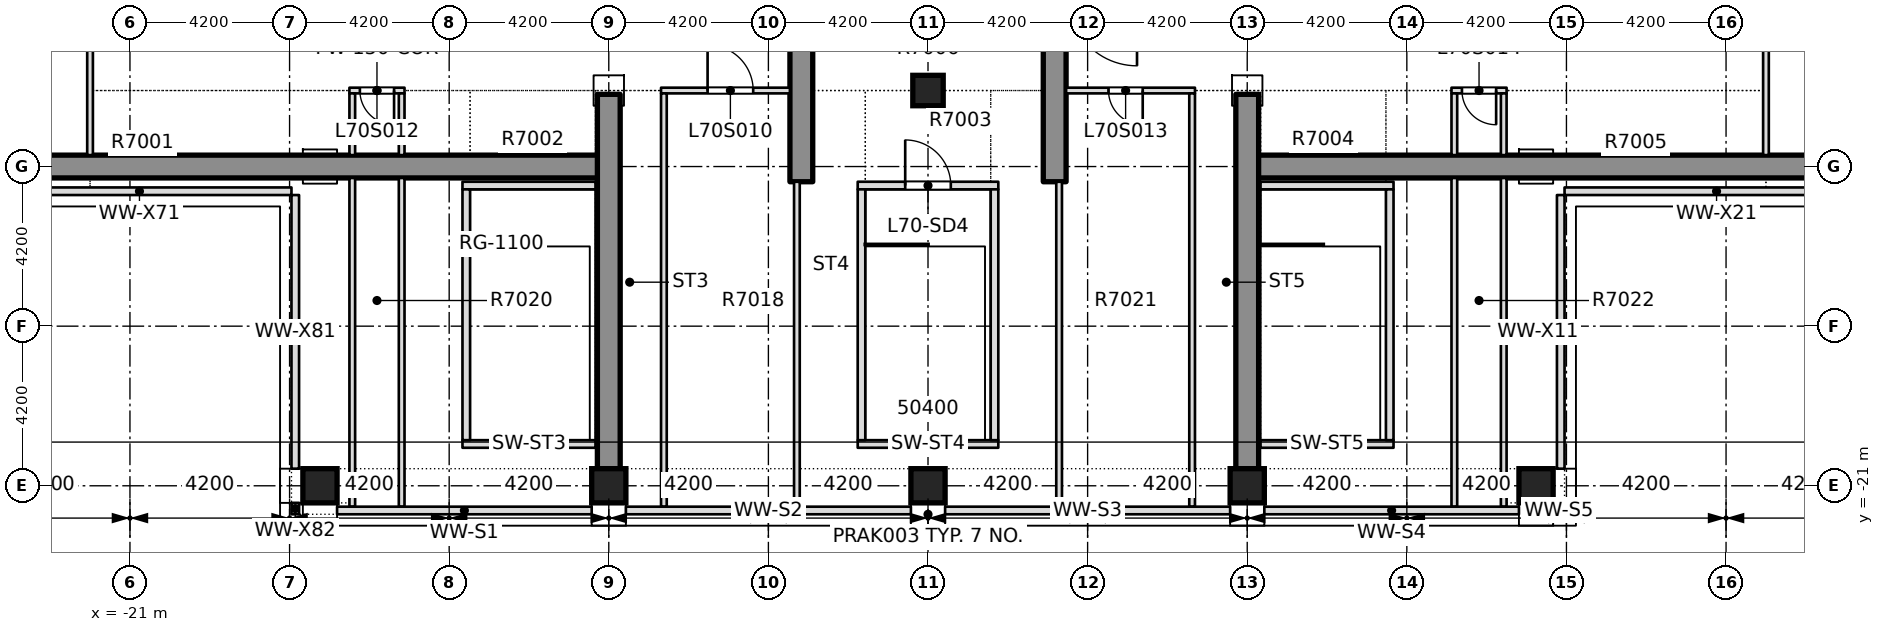
"""IFC4 building model, lengths in metres.
Left out: names, types, materials, properties, quantities, classifications, styles, units other than length and angle.
Written with IfcOpenShell. Run it as: python <this file> out.ifc"""

import sys

from ifc_helpers import new_model, si_unit, direction, frame, frame_2d, origin, origin_2d, place, context, subcontext, project, spatial, rectangle, extrude, element, fill, save


model = new_model("IFC4")
c1 = context("Model", 3, precision=1e-05, world=origin(), true_north=direction((0.0, 1.0)))
c2 = subcontext(c1, "Body", "Model", "MODEL_VIEW")
j1 = project(units=[si_unit("LENGTHUNIT", "METRE"), si_unit("PLANEANGLEUNIT", "RADIAN")], contexts=[c1])
p1 = place(None, origin())
s1 = spatial("IfcSite", under=j1, at=p1, CompositionType="ELEMENT")
p2 = place(p1, origin())
s2 = spatial("IfcBuilding", under=s1, at=p2, CompositionType="ELEMENT")
p3 = place(p2, frame((0.0, 0.0, 264.85)))
s3 = spatial("IfcBuildingStorey", under=s2, at=p3, CompositionType="ELEMENT", Elevation=264.85)
for number, where, z_axis, x_axis in (
    (1, (-16.0, -21.0, -0.5), (0.0, 0.0, 1.0), (1.0, 0.0, 0.0)),
    (2, (-8.4, -21.0, -0.5), (0.0, 0.0, 1.0), (1.0, 0.0, 0.0)),
    (3, (0.0, -21.0, -0.5), (0.0, 0.0, 1.0), (1.0, 0.0, 0.0)),
    (4, (8.4, -21.0, -0.5), (0.0, 0.0, 1.0), (1.0, 0.0, 0.0)),
    (5, (16.0, -21.0, -0.5), (0.0, 0.0, 1.0), (1.0, 0.0, 0.0)),
):
    element("IfcColumn", number, at=place(p3, frame(where, z_axis=z_axis, x_axis=x_axis)), inside=s3, PredefinedType="COLUMN", context=c2, shape_type="SweptSolid", body=[
        extrude(rectangle(XDim=0.9, YDim=0.9, at=origin_2d()), origin(), (0.0, 0.0, 1.0), 1.6),
    ])
p4 = place(p3, frame((0.0, -10.6, -0.5), z_axis=(0.0, 0.0, 1.0), x_axis=(1.0, 0.0, 0.0)))
e6 = element("IfcColumn", 6, at=p4, inside=s3, PredefinedType="COLUMN", context=c2, shape_type="SweptSolid", body=[
    extrude(rectangle(XDim=0.8, YDim=0.8, at=origin_2d()), origin(), (0.0, 0.0, 1.0), 3.0),
])
for number, where, z_axis, x_axis in (
    (7, (-3.333, -13.0, 0.0), (0.0, 0.0, 1.0), (0.0, 1.0, 0.0)),
    (8, (3.333, -13.0, 0.0), (0.0, 0.0, 1.0), (0.0, 1.0, 0.0)),
):
    element("IfcWall", number, at=place(p3, frame(where, z_axis=z_axis, x_axis=x_axis)), inside=s3, PredefinedType="SOLIDWALL", context=c2, shape_type="SweptSolid", body=[
        extrude(rectangle(XDim=4.6, YDim=0.6, at=frame_2d((2.3, 0.0))), origin(), (0.0, 0.0, 1.0), 4.0),
    ])
for number, where, z_axis, x_axis in (
    (9, (8.55, -12.6, 0.0), (0.0, 0.0, 1.0), (1.0, 0.0, 0.0)),
    (10, (-8.55, -12.6, 0.0), (0.0, 0.0, 1.0), (-1.0, 0.0, 0.0)),
):
    element("IfcWall", number, at=place(p3, frame(where, z_axis=z_axis, x_axis=x_axis)), inside=s3, PredefinedType="SHEAR", context=c2, shape_type="SweptSolid", body=[
        extrude(rectangle(XDim=16.65, YDim=0.6, at=frame_2d((8.325, 0.0))), origin(), (0.0, 0.0, 1.0), 4.0),
    ])
for number, where, z_axis, x_axis in (
    (11, (-8.4, -10.7, 0.0), (0.0, 0.0, 1.0), (0.0, -1.0, 0.0)),
    (12, (8.4, -10.7, 0.0), (0.0, 0.0, 1.0), (0.0, -1.0, 0.0)),
):
    element("IfcWall", number, at=place(p3, frame(where, z_axis=z_axis, x_axis=x_axis)), inside=s3, PredefinedType="SHEAR", context=c2, shape_type="SweptSolid", body=[
        extrude(rectangle(XDim=9.85, YDim=0.6, at=frame_2d((4.925, 0.0))), origin(), (0.0, 0.0, 1.0), 4.0),
    ])
p5 = place(p3, frame((-15.225, -10.6, 0.0), z_axis=(0.0, 0.0, 1.0), x_axis=(1.0, 0.0, 0.0)))
e13 = element("IfcWall", 13, at=p5, inside=s3, PredefinedType="PARTITIONING", context=c2, shape_type="SweptSolid", body=[
    extrude(rectangle(XDim=1.45, YDim=0.15, at=frame_2d((0.725, 0.0))), origin(), (0.0, 0.0, 1.0), 4.0),
])
p6 = place(p5, frame((0.275, 0.0, 0.0)))
e14 = element("IfcOpeningElement", 14, at=p6, cuts=e13, PredefinedType="OPENING", context=c2, shape_type="SweptSolid", body=[
    extrude(rectangle(XDim=0.9, YDim=2.1, at=frame_2d((0.45, 1.05))), frame((0.0, 0.085, 0.0), z_axis=(0.0, -1.0, 0.0), x_axis=(1.0, 0.0, 0.0)), (0.0, 0.0, 1.0), 0.17),
])
p7 = place(p3, frame((-7.025, -10.6, 0.0), z_axis=(0.0, 0.0, 1.0), x_axis=(1.0, 0.0, 0.0)))
e15 = element("IfcWall", 15, at=p7, inside=s3, PredefinedType="PARTITIONING", context=c2, shape_type="SweptSolid", body=[
    extrude(rectangle(XDim=3.391, YDim=0.15, at=frame_2d((1.695, 0.0))), origin(), (0.0, 0.0, 1.0), 2.5),
])
p8 = place(p7, frame((1.225, 0.0, 0.0)))
e16 = element("IfcOpeningElement", 16, at=p8, cuts=e15, PredefinedType="OPENING", context=c2, shape_type="SweptSolid", body=[
    extrude(rectangle(XDim=1.2, YDim=2.1, at=frame_2d((0.6, 1.05))), frame((0.0, 0.085, 0.0), z_axis=(0.0, -1.0, 0.0), x_axis=(1.0, 0.0, 0.0)), (0.0, 0.0, 1.0), 0.17),
])
p9 = place(p3, frame((3.634, -10.6, 0.0), z_axis=(0.0, 0.0, 1.0), x_axis=(1.0, 0.0, 0.0)))
e17 = element("IfcWall", 17, at=p9, inside=s3, PredefinedType="PARTITIONING", context=c2, shape_type="SweptSolid", body=[
    extrude(rectangle(XDim=3.391, YDim=0.15, at=frame_2d((1.695, 0.0))), origin(), (0.0, 0.0, 1.0), 2.5),
])
p10 = place(p9, frame((1.116, 0.0, 0.0)))
e18 = element("IfcOpeningElement", 18, at=p10, cuts=e17, PredefinedType="OPENING", context=c2, shape_type="SweptSolid", body=[
    extrude(rectangle(XDim=0.9, YDim=2.1, at=frame_2d((0.45, 1.05))), frame((0.0, 0.085, 0.0), z_axis=(0.0, -1.0, 0.0), x_axis=(1.0, 0.0, 0.0)), (0.0, 0.0, 1.0), 0.17),
])
p11 = place(p3, frame((13.775, -10.6, 0.0), z_axis=(0.0, 0.0, 1.0), x_axis=(1.0, 0.0, 0.0)))
e19 = element("IfcWall", 19, at=p11, inside=s3, PredefinedType="PARTITIONING", context=c2, shape_type="SweptSolid", body=[
    extrude(rectangle(XDim=1.45, YDim=0.15, at=frame_2d((0.725, 0.0))), origin(), (0.0, 0.0, 1.0), 4.0),
])
p12 = place(p11, frame((0.275, 0.0, 0.0)))
e20 = element("IfcOpeningElement", 20, at=p12, cuts=e19, PredefinedType="OPENING", context=c2, shape_type="SweptSolid", body=[
    extrude(rectangle(XDim=0.9, YDim=2.1, at=frame_2d((0.45, 1.05))), frame((0.0, 0.085, 0.0), z_axis=(0.0, -1.0, 0.0), x_axis=(1.0, 0.0, 0.0)), (0.0, 0.0, 1.0), 0.17),
])
p13 = place(p3, frame((-22.05, -12.299, 0.0), z_axis=(0.0, 0.0, 1.0), x_axis=(0.0, 1.0, 0.0)))
e21 = element("IfcWall", 21, at=p13, inside=s3, PredefinedType="PARTITIONING", context=c2, shape_type="SweptSolid", body=[
    extrude(rectangle(XDim=3.824, YDim=0.15, at=frame_2d((1.912, 0.0))), origin(), (0.0, 0.0, 1.0), 4.0),
])
p14 = place(p3, frame((-15.15, -21.55, 0.0), z_axis=(0.0, 0.0, 1.0), x_axis=(0.0, 1.0, 0.0)))
e22 = element("IfcWall", 22, at=p14, inside=s3, PredefinedType="PARTITIONING", context=c2, shape_type="SweptSolid", body=[
    extrude(rectangle(XDim=8.649, YDim=0.15, at=frame_2d((4.325, 0.0))), origin(), (0.0, 0.0, 1.0), 4.0),
])
p15 = place(p3, frame((-15.15, -12.299, 0.0), z_axis=(0.0, 0.0, 1.0), x_axis=(0.0, 1.0, 0.0)))
e23 = element("IfcWall", 23, at=p15, inside=s3, PredefinedType="PARTITIONING", context=c2, shape_type="SweptSolid", body=[
    extrude(rectangle(XDim=1.624, YDim=0.15, at=frame_2d((0.812, 0.0))), origin(), (0.0, 0.0, 1.0), 4.0),
])
p16 = place(p3, frame((-13.85, -21.55, 0.0), z_axis=(0.0, 0.0, 1.0), x_axis=(0.0, 1.0, 0.0)))
e24 = element("IfcWall", 24, at=p16, inside=s3, PredefinedType="PARTITIONING", context=c2, shape_type="SweptSolid", body=[
    extrude(rectangle(XDim=8.649, YDim=0.15, at=frame_2d((4.325, 0.0))), origin(), (0.0, 0.0, 1.0), 4.0),
])
p17 = place(p3, frame((-13.85, -12.299, 0.0), z_axis=(0.0, 0.0, 1.0), x_axis=(0.0, 1.0, 0.0)))
e25 = element("IfcWall", 25, at=p17, inside=s3, PredefinedType="PARTITIONING", context=c2, shape_type="SweptSolid", body=[
    extrude(rectangle(XDim=1.624, YDim=0.15, at=frame_2d((0.812, 0.0))), origin(), (0.0, 0.0, 1.0), 4.0),
])
p18 = place(p3, frame((-6.95, -21.55, 0.0), z_axis=(0.0, 0.0, 1.0), x_axis=(0.0, 1.0, 0.0)))
e26 = element("IfcWall", 26, at=p18, inside=s3, PredefinedType="PARTITIONING", context=c2, shape_type="SweptSolid", body=[
    extrude(rectangle(XDim=10.875, YDim=0.15, at=frame_2d((5.438, 0.0))), origin(), (0.0, 0.0, 1.0), 4.0),
])
for number, where, z_axis, x_axis in (
    (27, (-3.45, -21.55, 0.0), (0.0, 0.0, 1.0), (0.0, 1.0, 0.0)),
    (28, (3.45, -21.55, 0.0), (0.0, 0.0, 1.0), (0.0, 1.0, 0.0)),
):
    element("IfcWall", number, at=place(p3, frame(where, z_axis=z_axis, x_axis=x_axis)), inside=s3, PredefinedType="PARTITIONING", context=c2, shape_type="SweptSolid", body=[
        extrude(rectangle(XDim=8.549, YDim=0.15, at=frame_2d((4.274, 0.0))), origin(), (0.0, 0.0, 1.0), 4.0),
    ])
p19 = place(p3, frame((6.95, -21.55, 0.0), z_axis=(0.0, 0.0, 1.0), x_axis=(0.0, 1.0, 0.0)))
e29 = element("IfcWall", 29, at=p19, inside=s3, PredefinedType="PARTITIONING", context=c2, shape_type="SweptSolid", body=[
    extrude(rectangle(XDim=10.875, YDim=0.15, at=frame_2d((5.438, 0.0))), origin(), (0.0, 0.0, 1.0), 4.0),
])
p20 = place(p3, frame((13.85, -21.55, 0.0), z_axis=(0.0, 0.0, 1.0), x_axis=(0.0, 1.0, 0.0)))
e30 = element("IfcWall", 30, at=p20, inside=s3, PredefinedType="PARTITIONING", context=c2, shape_type="SweptSolid", body=[
    extrude(rectangle(XDim=8.649, YDim=0.15, at=frame_2d((4.325, 0.0))), origin(), (0.0, 0.0, 1.0), 4.0),
])
p21 = place(p3, frame((13.85, -12.299, 0.0), z_axis=(0.0, 0.0, 1.0), x_axis=(0.0, 1.0, 0.0)))
e31 = element("IfcWall", 31, at=p21, inside=s3, PredefinedType="PARTITIONING", context=c2, shape_type="SweptSolid", body=[
    extrude(rectangle(XDim=1.624, YDim=0.15, at=frame_2d((0.812, 0.0))), origin(), (0.0, 0.0, 1.0), 4.0),
])
p22 = place(p3, frame((15.15, -21.55, 0.0), z_axis=(0.0, 0.0, 1.0), x_axis=(0.0, 1.0, 0.0)))
e32 = element("IfcWall", 32, at=p22, inside=s3, PredefinedType="PARTITIONING", context=c2, shape_type="SweptSolid", body=[
    extrude(rectangle(XDim=8.649, YDim=0.15, at=frame_2d((4.325, 0.0))), origin(), (0.0, 0.0, 1.0), 4.0),
])
p23 = place(p3, frame((15.15, -12.299, 0.0), z_axis=(0.0, 0.0, 1.0), x_axis=(0.0, 1.0, 0.0)))
e33 = element("IfcWall", 33, at=p23, inside=s3, PredefinedType="PARTITIONING", context=c2, shape_type="SweptSolid", body=[
    extrude(rectangle(XDim=1.624, YDim=0.15, at=frame_2d((0.812, 0.0))), origin(), (0.0, 0.0, 1.0), 4.0),
])
p24 = place(p3, frame((22.05, -12.299, 0.0), z_axis=(0.0, 0.0, 1.0), x_axis=(0.0, 1.0, 0.0)))
e34 = element("IfcWall", 34, at=p24, inside=s3, PredefinedType="PARTITIONING", context=c2, shape_type="SweptSolid", body=[
    extrude(rectangle(XDim=3.824, YDim=0.15, at=frame_2d((1.912, 0.0))), origin(), (0.0, 0.0, 1.0), 4.0),
])
p25 = place(p3, frame((-15.55, -21.65, 0.0), z_axis=(0.0, 0.0, 1.0), x_axis=(1.0, 0.0, 0.0)))
e35 = element("IfcWall", 35, at=p25, inside=s3, PredefinedType="STANDARD", context=c2, shape_type="SweptSolid", body=[
    extrude(rectangle(XDim=6.7, YDim=0.2, at=frame_2d((3.35, 0.0))), origin(), (0.0, 0.0, 1.0), 4.0),
])
for number, where, z_axis, x_axis in (
    (36, (-7.95, -21.65, 0.0), (0.0, 0.0, 1.0), (1.0, 0.0, 0.0)),
    (37, (0.45, -21.65, 0.0), (0.0, 0.0, 1.0), (1.0, 0.0, 0.0)),
):
    element("IfcWall", number, at=place(p3, frame(where, z_axis=z_axis, x_axis=x_axis)), inside=s3, PredefinedType="STANDARD", context=c2, shape_type="SweptSolid", body=[
        extrude(rectangle(XDim=7.5, YDim=0.2, at=frame_2d((3.75, 0.0))), origin(), (0.0, 0.0, 1.0), 4.0),
    ])
p26 = place(p3, frame((8.85, -21.65, 0.0), z_axis=(0.0, 0.0, 1.0), x_axis=(1.0, 0.0, 0.0)))
e38 = element("IfcWall", 38, at=p26, inside=s3, PredefinedType="STANDARD", context=c2, shape_type="SweptSolid", body=[
    extrude(rectangle(XDim=6.7, YDim=0.2, at=frame_2d((3.35, 0.0))), origin(), (0.0, 0.0, 1.0), 4.0),
])
p27 = place(p3, frame((16.45, -21.65, 0.0), z_axis=(0.0, 0.0, 1.0), x_axis=(1.0, 0.0, 0.0)))
e39 = element("IfcWall", 39, at=p27, inside=s3, PredefinedType="STANDARD", context=c2, shape_type="SweptSolid", body=[
    extrude(rectangle(XDim=0.3, YDim=0.2, at=frame_2d((0.15, 0.0))), origin(), (0.0, 0.0, 1.0), 4.0),
])
p28 = place(p3, frame((16.65, -20.55, 0.0), z_axis=(0.0, 0.0, 1.0), x_axis=(0.0, 1.0, 0.0)))
e40 = element("IfcWall", 40, at=p28, inside=s3, PredefinedType="STANDARD", context=c2, shape_type="SweptSolid", body=[
    extrude(rectangle(XDim=7.2, YDim=0.2, at=frame_2d((3.6, 0.0))), origin(), (0.0, 0.0, 1.0), 4.0),
])
for number, where, z_axis, x_axis in (
    (41, (16.75, -13.25, 0.0), (0.0, 0.0, 1.0), (1.0, 0.0, 0.0)),
    (42, (-24.75, -13.25, 0.0), (0.0, 0.0, 1.0), (1.0, 0.0, 0.0)),
):
    element("IfcWall", number, at=place(p3, frame(where, z_axis=z_axis, x_axis=x_axis)), inside=s3, PredefinedType="STANDARD", context=c2, shape_type="SweptSolid", body=[
        extrude(rectangle(XDim=8.0, YDim=0.2, at=frame_2d((4.0, 0.0))), origin(), (0.0, 0.0, 1.0), 4.0),
    ])
p29 = place(p3, frame((-16.65, -13.35, 0.0), z_axis=(0.0, 0.0, 1.0), x_axis=(0.0, -1.0, 0.0)))
e43 = element("IfcWall", 43, at=p29, inside=s3, PredefinedType="STANDARD", context=c2, shape_type="SweptSolid", body=[
    extrude(rectangle(XDim=7.2, YDim=0.2, at=frame_2d((3.6, 0.0))), origin(), (0.0, 0.0, 1.0), 4.0),
])
p30 = place(p3, frame((-16.65, -21.45, 0.0), z_axis=(0.0, 0.0, 1.0), x_axis=(0.0, -1.0, 0.0)))
e44 = element("IfcWall", 44, at=p30, inside=s3, PredefinedType="STANDARD", context=c2, shape_type="SweptSolid", body=[
    extrude(rectangle(XDim=0.3, YDim=0.2, at=frame_2d((0.15, 0.0))), origin(), (0.0, 0.0, 1.0), 4.0),
])
for number, where, z_axis, x_axis in (
    (45, (-12.25, -19.9, 0.0), (0.0, 0.0, 1.0), (1.0, 0.0, 0.0)),
    (46, (-12.25, -13.1, 0.0), (0.0, 0.0, 1.0), (1.0, 0.0, 0.0)),
):
    element("IfcWall", number, at=place(p3, frame(where, z_axis=z_axis, x_axis=x_axis)), inside=s3, PredefinedType="PARTITIONING", context=c2, shape_type="SweptSolid", body=[
        extrude(rectangle(XDim=3.5, YDim=0.2, at=frame_2d((1.75, 0.0))), origin(), (0.0, 0.0, 1.0), 4.0),
    ])
p31 = place(p3, frame((-12.15, -19.8, 0.0), z_axis=(0.0, 0.0, 1.0), x_axis=(0.0, 1.0, 0.0)))
e47 = element("IfcWall", 47, at=p31, inside=s3, PredefinedType="PARTITIONING", context=c2, shape_type="SweptSolid", body=[
    extrude(rectangle(XDim=6.6, YDim=0.2, at=frame_2d((3.3, 0.0))), origin(), (0.0, 0.0, 1.0), 4.0),
])
p32 = place(p3, frame((-1.85, -19.9, 0.0), z_axis=(0.0, 0.0, 1.0), x_axis=(1.0, 0.0, 0.0)))
e48 = element("IfcWall", 48, at=p32, inside=s3, PredefinedType="PARTITIONING", context=c2, shape_type="SweptSolid", body=[
    extrude(rectangle(XDim=3.7, YDim=0.2, at=frame_2d((1.85, 0.0))), origin(), (0.0, 0.0, 1.0), 4.0),
])
p33 = place(p3, frame((-1.85, -13.1, 0.0), z_axis=(0.0, 0.0, 1.0), x_axis=(1.0, 0.0, 0.0)))
e49 = element("IfcWall", 49, at=p33, inside=s3, PredefinedType="PARTITIONING", context=c2, shape_type="SweptSolid", body=[
    extrude(rectangle(XDim=3.7, YDim=0.2, at=frame_2d((1.85, 0.0))), origin(), (0.0, 0.0, 1.0), 4.0),
])
p34 = place(p33, frame((1.25, 0.0, 0.0)))
e50 = element("IfcOpeningElement", 50, at=p34, cuts=e49, PredefinedType="OPENING", context=c2, shape_type="SweptSolid", body=[
    extrude(rectangle(XDim=1.2, YDim=2.1, at=frame_2d((0.6, 1.05))), frame((0.0, 0.11, 0.0), z_axis=(0.0, -1.0, 0.0), x_axis=(1.0, 0.0, 0.0)), (0.0, 0.0, 1.0), 0.22),
])
for number, where, z_axis, x_axis in (
    (51, (-1.75, -19.8, 0.0), (0.0, 0.0, 1.0), (0.0, 1.0, 0.0)),
    (52, (1.75, -19.8, 0.0), (0.0, 0.0, 1.0), (0.0, 1.0, 0.0)),
):
    element("IfcWall", number, at=place(p3, frame(where, z_axis=z_axis, x_axis=x_axis)), inside=s3, PredefinedType="PARTITIONING", context=c2, shape_type="SweptSolid", body=[
        extrude(rectangle(XDim=6.6, YDim=0.2, at=frame_2d((3.3, 0.0))), origin(), (0.0, 0.0, 1.0), 4.0),
    ])
for number, where, z_axis, x_axis in (
    (53, (8.75, -19.9, 0.0), (0.0, 0.0, 1.0), (1.0, 0.0, 0.0)),
    (54, (8.75, -13.1, 0.0), (0.0, 0.0, 1.0), (1.0, 0.0, 0.0)),
):
    element("IfcWall", number, at=place(p3, frame(where, z_axis=z_axis, x_axis=x_axis)), inside=s3, PredefinedType="PARTITIONING", context=c2, shape_type="SweptSolid", body=[
        extrude(rectangle(XDim=3.5, YDim=0.2, at=frame_2d((1.75, 0.0))), origin(), (0.0, 0.0, 1.0), 4.0),
    ])
p35 = place(p3, frame((12.15, -19.8, 0.0), z_axis=(0.0, 0.0, 1.0), x_axis=(0.0, 1.0, 0.0)))
e55 = element("IfcWall", 55, at=p35, inside=s3, PredefinedType="PARTITIONING", context=c2, shape_type="SweptSolid", body=[
    extrude(rectangle(XDim=6.6, YDim=0.2, at=frame_2d((3.3, 0.0))), origin(), (0.0, 0.0, 1.0), 4.0),
])
p36 = place(p8, origin())
e56 = element("IfcDoor", 56, at=p36, inside=s3, OperationType="SINGLE_SWING_LEFT", PredefinedType="DOOR", context=c2, shape_type="SweptSolid", body=[
    extrude(rectangle(XDim=1.2, YDim=2.1, at=frame_2d((0.6, 1.05))), frame((0.0, 0.025, 0.0), z_axis=(0.0, -1.0, 0.0), x_axis=(1.0, 0.0, 0.0)), (0.0, 0.0, 1.0), 0.05),
])
fill(e16, e56)
p37 = place(p6, origin())
e57 = element("IfcDoor", 57, at=p37, inside=s3, OperationType="SINGLE_SWING_RIGHT", PredefinedType="DOOR", context=c2, shape_type="SweptSolid", body=[
    extrude(rectangle(XDim=0.9, YDim=2.1, at=frame_2d((0.45, 1.05))), frame((0.0, 0.025, 0.0), z_axis=(0.0, -1.0, 0.0), x_axis=(1.0, 0.0, 0.0)), (0.0, 0.0, 1.0), 0.05),
])
fill(e14, e57)
p38 = place(p10, origin())
e58 = element("IfcDoor", 58, at=p38, inside=s3, OperationType="SINGLE_SWING_RIGHT", PredefinedType="DOOR", context=c2, shape_type="SweptSolid", body=[
    extrude(rectangle(XDim=0.9, YDim=2.1, at=frame_2d((0.45, 1.05))), frame((0.0, 0.025, 0.0), z_axis=(0.0, -1.0, 0.0), x_axis=(1.0, 0.0, 0.0)), (0.0, 0.0, 1.0), 0.05),
])
fill(e18, e58)
p39 = place(p12, origin())
e59 = element("IfcDoor", 59, at=p39, inside=s3, OperationType="SINGLE_SWING_RIGHT", PredefinedType="DOOR", context=c2, shape_type="SweptSolid", body=[
    extrude(rectangle(XDim=0.9, YDim=2.1, at=frame_2d((0.45, 1.05))), frame((0.0, 0.025, 0.0), z_axis=(0.0, -1.0, 0.0), x_axis=(1.0, 0.0, 0.0)), (0.0, 0.0, 1.0), 0.05),
])
fill(e20, e59)
p40 = place(p34, origin())
e60 = element("IfcDoor", 60, at=p40, inside=s3, OperationType="SINGLE_SWING_LEFT", PredefinedType="DOOR", context=c2, shape_type="SweptSolid", body=[
    extrude(rectangle(XDim=1.2, YDim=2.1, at=frame_2d((0.6, 1.05))), frame((0.0, 0.025, 0.0), z_axis=(0.0, -1.0, 0.0), x_axis=(1.0, 0.0, 0.0)), (0.0, 0.0, 1.0), 0.05),
])
fill(e50, e60)
save(model, sys.argv[1])
